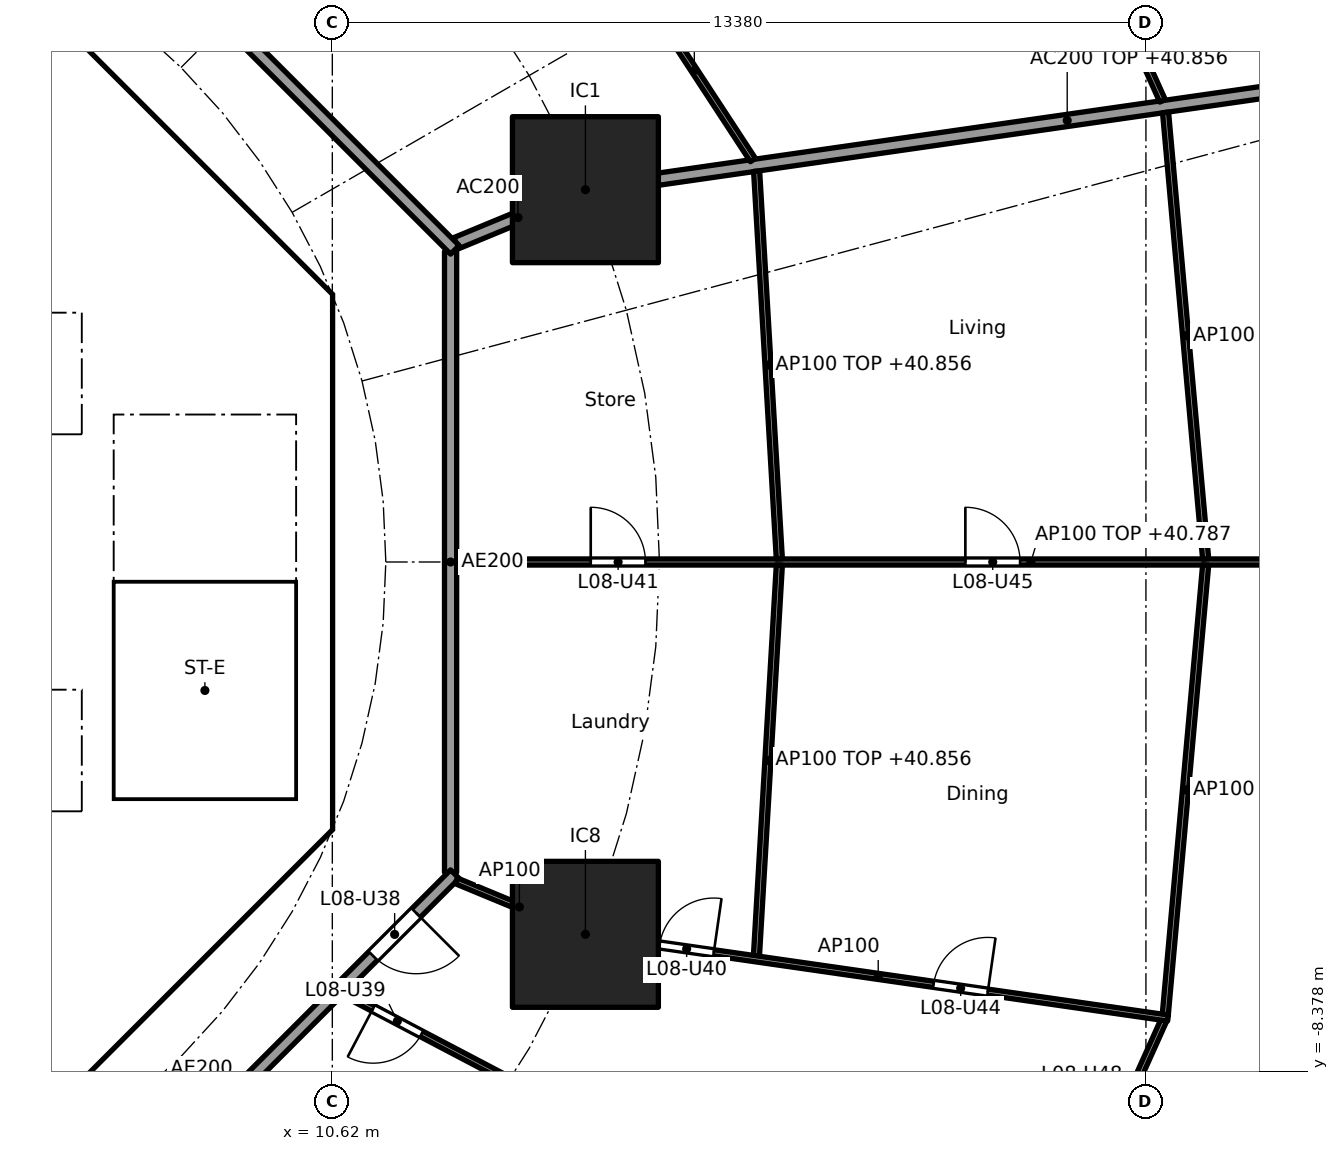
"""IFC4 building model, lengths in metres.
Left out: names, types, materials, properties, quantities, classifications, styles, units other than length and angle.
Written with IfcOpenShell. Run it as: python <this file> out.ifc"""

import sys

from ifc_helpers import new_model, si_unit, direction, frame, frame_2d, origin, origin_2d, place, context, subcontext, project, spatial, polyline, rectangle, outline, extrude, element, fill, save


model = new_model("IFC4")
c1 = context("Model", 3, precision=1e-05, world=origin(), true_north=direction((0.0, 1.0)))
c2 = subcontext(c1, "Body", "Model", "MODEL_VIEW")
j1 = project(units=[si_unit("LENGTHUNIT", "METRE"), si_unit("PLANEANGLEUNIT", "RADIAN")], contexts=[c1])
p1 = place(None, origin())
s1 = spatial("IfcSite", under=j1, at=p1, CompositionType="ELEMENT")
p2 = place(p1, origin())
s2 = spatial("IfcBuilding", under=s1, at=p2, CompositionType="ELEMENT")
p3 = place(p2, frame((0.0, 0.0, 38.1)))
s3 = spatial("IfcBuildingStorey", under=s2, at=p3, CompositionType="ELEMENT", Elevation=38.1)
for number, where, z_axis, x_axis in (
    (1, (14.782, 6.123, 0.0), (0.0, 0.0, 1.0), (1.0, 0.0, 0.0)),
    (2, (14.782, -6.123, 0.0), (0.0, 0.0, 1.0), (1.0, 0.0, 0.0)),
):
    element("IfcColumn", number, at=place(p3, frame(where, z_axis=z_axis, x_axis=x_axis)), inside=s3, PredefinedType="COLUMN", context=c2, shape_type="SweptSolid", body=[
        extrude(rectangle(XDim=2.4, YDim=2.4, at=origin_2d()), origin(), (0.0, 0.0, 1.0), 3.7),
    ])
p4 = place(p3, frame((9.988, 4.613, 0.0), z_axis=(0.0, 0.0, 1.0), x_axis=(-0.707106781187, 0.707106781187, 0.0)))
e3 = element("IfcWall", 3, at=p4, inside=s3, PredefinedType="SHEAR", context=c2, shape_type="SweptSolid", body=[
    extrude(rectangle(XDim=7.602, YDim=0.6, at=frame_2d((3.801, 0.0))), origin(), (0.0, 0.0, 1.0), 3.44),
])
p5 = place(p4, frame((3.201, 0.0, 0.0)))
e4 = element("IfcOpeningElement", 4, at=p5, cuts=e3, PredefinedType="OPENING", context=c2, shape_type="SweptSolid", body=[
    extrude(rectangle(XDim=1.2, YDim=2.1, at=frame_2d((0.6, 1.05))), frame((0.0, 0.31, 0.0), z_axis=(0.0, -1.0, 0.0), x_axis=(1.0, 0.0, 0.0)), (0.0, 0.0, 1.0), 0.62),
])
p6 = place(p3, frame((4.613, -9.988, 0.0), z_axis=(0.0, 0.0, 1.0), x_axis=(0.707106781187, 0.707106781187, 0.0)))
e5 = element("IfcWall", 5, at=p6, inside=s3, PredefinedType="SHEAR", context=c2, shape_type="SweptSolid", body=[
    extrude(rectangle(XDim=7.602, YDim=0.6, at=frame_2d((3.801, 0.0))), origin(), (0.0, 0.0, 1.0), 3.44),
])
p7 = place(p6, frame((3.201, 0.0, 0.0)))
e6 = element("IfcOpeningElement", 6, at=p7, cuts=e5, PredefinedType="OPENING", context=c2, shape_type="SweptSolid", body=[
    extrude(rectangle(XDim=1.2, YDim=2.1, at=frame_2d((0.6, 1.05))), frame((0.0, 0.31, 0.0), z_axis=(0.0, -1.0, 0.0), x_axis=(1.0, 0.0, 0.0)), (0.0, 0.0, 1.0), 0.62),
])
p8 = place(p3, frame((-6.7, 2.0, 0.0), z_axis=(0.0, 0.0, 1.0), x_axis=(1.0, 0.0, 0.0)))
e7 = element("IfcWall", 7, at=p8, inside=s3, PredefinedType="SOLIDWALL", context=c2, shape_type="SweptSolid", body=[
    extrude(rectangle(XDim=13.4, YDim=0.2, at=frame_2d((6.7, 0.0))), origin(), (0.0, 0.0, 1.0), 3.44),
])
p9 = place(p8, frame((0.65, 0.0, 0.0)))
e8 = element("IfcOpeningElement", 8, at=p9, cuts=e7, PredefinedType="OPENING", context=c2, shape_type="SweptSolid", body=[
    extrude(rectangle(XDim=1.1, YDim=2.1, at=frame_2d((0.55, 1.05))), frame((0.0, 0.11, 0.0), z_axis=(0.0, -1.0, 0.0), x_axis=(1.0, 0.0, 0.0)), (0.0, 0.0, 1.0), 0.22),
])
p10 = place(p8, frame((2.85, 0.0, 0.0)))
e9 = element("IfcOpeningElement", 9, at=p10, cuts=e7, PredefinedType="OPENING", context=c2, shape_type="SweptSolid", body=[
    extrude(rectangle(XDim=1.1, YDim=2.1, at=frame_2d((0.55, 1.05))), frame((0.0, 0.11, 0.0), z_axis=(0.0, -1.0, 0.0), x_axis=(1.0, 0.0, 0.0)), (0.0, 0.0, 1.0), 0.22),
])
p11 = place(p8, frame((5.05, 0.0, 0.0)))
e10 = element("IfcOpeningElement", 10, at=p11, cuts=e7, PredefinedType="OPENING", context=c2, shape_type="SweptSolid", body=[
    extrude(rectangle(XDim=1.1, YDim=2.1, at=frame_2d((0.55, 1.05))), frame((0.0, 0.11, 0.0), z_axis=(0.0, -1.0, 0.0), x_axis=(1.0, 0.0, 0.0)), (0.0, 0.0, 1.0), 0.22),
])
p12 = place(p3, frame((6.7, 4.0, 0.0), z_axis=(0.0, 0.0, 1.0), x_axis=(1.0, 0.0, 0.0)))
e11 = element("IfcWall", 11, at=p12, inside=s3, PredefinedType="SOLIDWALL", context=c2, shape_type="SweptSolid", body=[
    extrude(rectangle(XDim=3.325, YDim=0.2, at=frame_2d((1.662, 0.0))), origin(), (0.0, 0.0, 1.0), 3.44),
])
p13 = place(p12, frame((1.25, 0.0, 0.0)))
e12 = element("IfcOpeningElement", 12, at=p13, cuts=e11, PredefinedType="OPENING", context=c2, shape_type="SweptSolid", body=[
    extrude(rectangle(XDim=1.1, YDim=2.1, at=frame_2d((0.55, 1.05))), frame((0.0, 0.11, 0.0), z_axis=(0.0, -1.0, 0.0), x_axis=(1.0, 0.0, 0.0)), (0.0, 0.0, 1.0), 0.22),
])
p14 = place(p3, frame((-6.7, -2.0, 0.0), z_axis=(0.0, 0.0, 1.0), x_axis=(1.0, 0.0, 0.0)))
e13 = element("IfcWall", 13, at=p14, inside=s3, PredefinedType="SOLIDWALL", context=c2, shape_type="SweptSolid", body=[
    extrude(rectangle(XDim=13.4, YDim=0.2, at=frame_2d((6.7, 0.0))), origin(), (0.0, 0.0, 1.0), 3.44),
])
p15 = place(p14, frame((0.65, 0.0, 0.0)))
e14 = element("IfcOpeningElement", 14, at=p15, cuts=e13, PredefinedType="OPENING", context=c2, shape_type="SweptSolid", body=[
    extrude(rectangle(XDim=1.1, YDim=2.1, at=frame_2d((0.55, 1.05))), frame((0.0, 0.11, 0.0), z_axis=(0.0, -1.0, 0.0), x_axis=(1.0, 0.0, 0.0)), (0.0, 0.0, 1.0), 0.22),
])
p16 = place(p14, frame((2.85, 0.0, 0.0)))
e15 = element("IfcOpeningElement", 15, at=p16, cuts=e13, PredefinedType="OPENING", context=c2, shape_type="SweptSolid", body=[
    extrude(rectangle(XDim=1.1, YDim=2.1, at=frame_2d((0.55, 1.05))), frame((0.0, 0.11, 0.0), z_axis=(0.0, -1.0, 0.0), x_axis=(1.0, 0.0, 0.0)), (0.0, 0.0, 1.0), 0.22),
])
p17 = place(p3, origin())
e16 = element("IfcWall", 16, at=p17, inside=s3, PredefinedType="SHEAR", context=c2, shape_type="SweptSolid", body=[
    extrude(outline(polyline([(9.776, -4.401), (10.025, -4.152), (10.025, -3.801), (10.025, 4.152), (9.776, 4.401), (10.2, 4.825), (10.625, 4.401), (10.625, -4.401), (10.2, -4.825), (9.776, -4.401)])), origin(), (0.0, 0.0, 1.0), 3.44),
])
p18 = place(p3, origin())
e17 = element("IfcWall", 17, at=p18, inside=s3, PredefinedType="SOLIDWALL", context=c2, shape_type="SweptSolid", body=[
    extrude(outline(polyline([(-6.7, -2.1), (-6.5, -2.1), (-6.5, -4.1), (-4.5, -4.1), (-4.5, -2.1), (-4.3, -2.1), (-4.3, -4.1), (-2.3, -4.1), (-2.3, -2.1), (-2.1, -2.1), (-2.1, -4.1), (-0.1, -4.1), (-0.1, -2.1), (0.1, -2.1), (0.1, -4.1), (2.1, -4.1), (2.1, -2.1), (2.3, -2.1), (2.3, -4.1), (4.3, -4.1), (4.3, -2.1), (4.5, -2.1), (4.5, -4.1), (6.5, -4.1), (6.5, -2.1), (6.7, -2.1), (6.7, -4.3), (-6.7, -4.3), (-6.7, -2.1)])), origin(), (0.0, 0.0, 1.0), 3.44),
])
p19 = place(p3, origin())
e18 = element("IfcWall", 18, at=p19, inside=s3, PredefinedType="SOLIDWALL", context=c2, shape_type="SweptSolid", body=[
    extrude(outline(polyline([(-6.5, 2.1), (-6.7, 2.1), (-6.7, 4.3), (6.7, 4.3), (6.7, 2.1), (6.5, 2.1), (6.5, 4.1), (4.5, 4.1), (4.5, 2.1), (4.3, 2.1), (4.3, 4.1), (2.3, 4.1), (2.3, 2.1), (2.1, 2.1), (2.1, 4.1), (0.1, 4.1), (0.1, 2.1), (-0.1, 2.1), (-0.1, 4.1), (-2.1, 4.1), (-2.1, 2.1), (-2.3, 2.1), (-2.3, 4.1), (-4.3, 4.1), (-4.3, 2.1), (-4.5, 2.1), (-4.5, 4.1), (-6.5, 4.1), (-6.5, 2.1)])), origin(), (0.0, 0.0, 1.0), 3.44),
])
p20 = place(p3, origin())
e19 = element("IfcWall", 19, at=p20, inside=s3, PredefinedType="SOLIDWALL", context=c2, shape_type="SweptSolid", body=[
    extrude(outline(polyline([(7.025, -3.9), (6.7, -3.9), (6.7, 3.9), (7.025, 3.9), (7.025, -3.9)])), origin(), (0.0, 0.0, 1.0), 3.44),
])
p21 = place(p3, origin())
e20 = element("IfcWall", 20, at=p21, inside=s3, PredefinedType="SOLIDWALL", context=c2, shape_type="SweptSolid", body=[
    extrude(outline(polyline([(10.025, -4.1), (6.7, -4.1), (6.7, -3.9), (10.025, -3.9), (10.025, -4.1)])), origin(), (0.0, 0.0, 1.0), 3.44),
])
p22 = place(p3, frame((12.657, 5.243, 0.0), z_axis=(0.0, 0.0, 1.0), x_axis=(0.923853160736, 0.382747093259, 0.0)))
e21 = element("IfcWall", 21, at=p22, inside=s3, PredefinedType="PARTITIONING", context=c2, shape_type="SweptSolid", body=[
    extrude(rectangle(XDim=2.2, YDim=0.2, at=frame_2d((1.1, 0.0))), origin(), (0.0, 0.0, 1.0), 3.44),
])
p23 = place(p3, frame((14.832, 6.13, 0.0), z_axis=(0.0, 0.0, 1.0), x_axis=(0.989836541293, 0.142209779978, 0.0)))
e22 = element("IfcWall", 22, at=p23, inside=s3, PredefinedType="PARTITIONING", context=c2, shape_type="SweptSolid", body=[
    extrude(rectangle(XDim=15.909, YDim=0.2, at=frame_2d((7.955, 0.0))), origin(), (0.0, 0.0, 1.0), 2.756),
])
p24 = place(p3, frame((12.565, -5.104, 0.0), z_axis=(0.0, 0.0, 1.0), x_axis=(0.0, 1.0, 0.0)))
e23 = element("IfcWall", 23, at=p24, inside=s3, PredefinedType="PARTITIONING", context=c2, shape_type="SweptSolid", body=[
    extrude(rectangle(XDim=10.209, YDim=0.2, at=frame_2d((5.104, 0.0))), origin(), (0.0, 0.0, 1.0), 3.44),
])
p25 = place(p3, frame((12.635, 5.134, 0.0), z_axis=(0.0, 0.0, 1.0), x_axis=(-0.707106781187, 0.707106781187, 0.0)))
e24 = element("IfcWall", 24, at=p25, inside=s3, PredefinedType="PARTITIONING", context=c2, shape_type="SweptSolid", body=[
    extrude(rectangle(XDim=10.609, YDim=0.2, at=frame_2d((5.305, 0.0))), origin(), (0.0, 0.0, 1.0), 3.44),
])
p26 = place(p3, frame((5.275, -12.494, 0.0), z_axis=(0.0, 0.0, 1.0), x_axis=(0.707106781187, 0.707106781187, 0.0)))
e25 = element("IfcWall", 25, at=p26, inside=s3, PredefinedType="PARTITIONING", context=c2, shape_type="SweptSolid", body=[
    extrude(rectangle(XDim=10.409, YDim=0.2, at=frame_2d((5.205, 0.0))), origin(), (0.0, 0.0, 1.0), 3.44),
])
p27 = place(p26, frame((8.508, 0.0, 0.0)))
e26 = element("IfcOpeningElement", 26, at=p27, cuts=e25, PredefinedType="OPENING", context=c2, shape_type="SweptSolid", body=[
    extrude(rectangle(XDim=1.0, YDim=2.1, at=frame_2d((0.5, 1.05))), frame((0.0, 0.11, 0.0), z_axis=(0.0, -1.0, 0.0), x_axis=(1.0, 0.0, 0.0)), (0.0, 0.0, 1.0), 0.22),
])
p28 = place(p3, frame((12.665, 0.0, 0.0), z_axis=(0.0, 0.0, 1.0), x_axis=(1.0, 0.0, 0.0)))
e27 = element("IfcWall", 27, at=p28, inside=s3, PredefinedType="PARTITIONING", context=c2, shape_type="SweptSolid", body=[
    extrude(rectangle(XDim=18.885, YDim=0.1, at=frame_2d((9.443, 0.0))), origin(), (0.0, 0.0, 1.0), 2.687),
])
p29 = place(p28, frame((2.205, 0.0, 0.0)))
e28 = element("IfcOpeningElement", 28, at=p29, cuts=e27, PredefinedType="OPENING", context=c2, shape_type="SweptSolid", body=[
    extrude(rectangle(XDim=0.9, YDim=2.1, at=frame_2d((0.45, 1.05))), frame((0.0, 0.06, 0.0), z_axis=(0.0, -1.0, 0.0), x_axis=(1.0, 0.0, 0.0)), (0.0, 0.0, 1.0), 0.12),
])
p30 = place(p28, frame((8.366, 0.0, 0.0)))
e29 = element("IfcOpeningElement", 29, at=p30, cuts=e27, PredefinedType="OPENING", context=c2, shape_type="SweptSolid", body=[
    extrude(rectangle(XDim=0.9, YDim=2.1, at=frame_2d((0.45, 1.05))), frame((0.0, 0.06, 0.0), z_axis=(0.0, -1.0, 0.0), x_axis=(1.0, 0.0, 0.0)), (0.0, 0.0, 1.0), 0.12),
])
p31 = place(p28, frame((15.154, 0.0, 0.0)))
e30 = element("IfcOpeningElement", 30, at=p31, cuts=e27, PredefinedType="OPENING", context=c2, shape_type="SweptSolid", body=[
    extrude(rectangle(XDim=0.9, YDim=2.1, at=frame_2d((0.45, 1.05))), frame((0.0, 0.06, 0.0), z_axis=(0.0, -1.0, 0.0), x_axis=(1.0, 0.0, 0.0)), (0.0, 0.0, 1.0), 0.12),
])
p32 = place(p3, frame((17.971, 0.05, 0.0), z_axis=(0.0, 0.0, 1.0), x_axis=(-0.058513659907, 0.998286607946, 0.0)))
e31 = element("IfcWall", 31, at=p32, inside=s3, PredefinedType="PARTITIONING", context=c2, shape_type="SweptSolid", body=[
    extrude(rectangle(XDim=6.388, YDim=0.1, at=frame_2d((3.194, 0.0))), origin(), (0.0, 0.0, 1.0), 2.756),
])
p33 = place(p3, frame((17.971, -0.05, 0.0), z_axis=(0.0, 0.0, 1.0), x_axis=(-0.058475267553, -0.998288857538, 0.0)))
e32 = element("IfcWall", 32, at=p33, inside=s3, PredefinedType="PARTITIONING", context=c2, shape_type="SweptSolid", body=[
    extrude(rectangle(XDim=6.438, YDim=0.1, at=frame_2d((3.219, 0.0))), origin(), (0.0, 0.0, 1.0), 2.756),
])
p34 = place(p3, frame((24.982, 0.05, 0.0), z_axis=(0.0, 0.0, 1.0), x_axis=(-0.08944290521, 0.995991951126, 0.0)))
e33 = element("IfcWall", 33, at=p34, inside=s3, PredefinedType="PARTITIONING", context=c2, shape_type="SweptSolid", body=[
    extrude(rectangle(XDim=7.373, YDim=0.1, at=frame_2d((3.686, 0.0))), origin(), (0.0, 0.0, 1.0), 2.756),
])
p35 = place(p3, frame((24.982, -0.05, 0.0), z_axis=(0.0, 0.0, 1.0), x_axis=(-0.089432471274, -0.995992888068, 0.0)))
e34 = element("IfcWall", 34, at=p35, inside=s3, PredefinedType="PARTITIONING", context=c2, shape_type="SweptSolid", body=[
    extrude(rectangle(XDim=7.423, YDim=0.1, at=frame_2d((3.711, 0.0))), origin(), (0.0, 0.0, 1.0), 2.756),
])
p36 = place(p3, frame((17.537, 6.61, 0.0), z_axis=(0.0, 0.0, 1.0), x_axis=(-0.547637987196, 0.836715384692, 0.0)))
e35 = element("IfcWall", 35, at=p36, inside=s3, PredefinedType="PARTITIONING", context=c2, shape_type="SweptSolid", body=[
    extrude(rectangle(XDim=3.52, YDim=0.1, at=frame_2d((1.76, 0.0))), origin(), (0.0, 0.0, 1.0), 2.756),
])
p37 = place(p3, frame((24.273, 7.584, 0.0), z_axis=(0.0, 0.0, 1.0), x_axis=(-0.410201529109, 0.911994904326, 0.0)))
e36 = element("IfcWall", 36, at=p37, inside=s3, PredefinedType="PARTITIONING", context=c2, shape_type="SweptSolid", body=[
    extrude(rectangle(XDim=5.787, YDim=0.1, at=frame_2d((2.894, 0.0))), origin(), (0.0, 0.0, 1.0), 2.756),
])
p38 = place(p37, frame((2.444, 0.0, 0.0)))
e37 = element("IfcOpeningElement", 37, at=p38, cuts=e36, PredefinedType="OPENING", context=c2, shape_type="SweptSolid", body=[
    extrude(rectangle(XDim=0.9, YDim=2.1, at=frame_2d((0.45, 1.05))), frame((0.0, 0.06, 0.0), z_axis=(0.0, -1.0, 0.0), x_axis=(1.0, 0.0, 0.0)), (0.0, 0.0, 1.0), 0.12),
])
p39 = place(p3, frame((10.813, -7.091, 0.0), z_axis=(0.0, 0.0, 1.0), x_axis=(0.885182649479, -0.465243674928, 0.0)))
e38 = element("IfcWall", 38, at=p39, inside=s3, PredefinedType="PARTITIONING", context=c2, shape_type="SweptSolid", body=[
    extrude(rectangle(XDim=12.551, YDim=0.1, at=frame_2d((6.275, 0.0))), origin(), (0.0, 0.0, 1.0), 2.687),
])
p40 = place(p39, frame((0.539, 0.0, 0.0)))
e39 = element("IfcOpeningElement", 39, at=p40, cuts=e38, PredefinedType="OPENING", context=c2, shape_type="SweptSolid", body=[
    extrude(rectangle(XDim=0.9, YDim=2.1, at=frame_2d((0.45, 1.05))), frame((0.0, 0.06, 0.0), z_axis=(0.0, -1.0, 0.0), x_axis=(1.0, 0.0, 0.0)), (0.0, 0.0, 1.0), 0.12),
])
p41 = place(p39, frame((8.494, 0.0, 0.0)))
e40 = element("IfcOpeningElement", 40, at=p41, cuts=e38, PredefinedType="OPENING", context=c2, shape_type="SweptSolid", body=[
    extrude(rectangle(XDim=0.9, YDim=2.1, at=frame_2d((0.45, 1.05))), frame((0.0, 0.06, 0.0), z_axis=(0.0, -1.0, 0.0), x_axis=(1.0, 0.0, 0.0)), (0.0, 0.0, 1.0), 0.12),
])
p42 = place(p3, frame((21.899, -12.861, 0.0), z_axis=(0.0, 0.0, 1.0), x_axis=(0.410197710154, 0.911996622025, 0.0)))
e41 = element("IfcWall", 41, at=p42, inside=s3, PredefinedType="PARTITIONING", context=c2, shape_type="SweptSolid", body=[
    extrude(rectangle(XDim=5.837, YDim=0.1, at=frame_2d((2.918, 0.0))), origin(), (0.0, 0.0, 1.0), 2.756),
])
p43 = place(p42, frame((3.928, 0.0, 0.0)))
e42 = element("IfcOpeningElement", 42, at=p43, cuts=e41, PredefinedType="OPENING", context=c2, shape_type="SweptSolid", body=[
    extrude(rectangle(XDim=0.9, YDim=2.1, at=frame_2d((0.45, 1.05))), frame((0.0, 0.06, 0.0), z_axis=(0.0, -1.0, 0.0), x_axis=(1.0, 0.0, 0.0)), (0.0, 0.0, 1.0), 0.12),
])
p44 = place(p3, frame((12.657, -5.243, 0.0), z_axis=(0.0, 0.0, 1.0), x_axis=(0.923864733477, -0.382719158442, 0.0)))
e43 = element("IfcWall", 43, at=p44, inside=s3, PredefinedType="PARTITIONING", context=c2, shape_type="SweptSolid", body=[
    extrude(rectangle(XDim=2.25, YDim=0.1, at=frame_2d((1.125, 0.0))), origin(), (0.0, 0.0, 1.0), 3.44),
])
p45 = place(p3, frame((14.832, -6.13, 0.0), z_axis=(0.0, 0.0, 1.0), x_axis=(0.989837122016, -0.142205737856, 0.0)))
e44 = element("IfcWall", 44, at=p45, inside=s3, PredefinedType="PARTITIONING", context=c2, shape_type="SweptSolid", body=[
    extrude(rectangle(XDim=9.63, YDim=0.1, at=frame_2d((4.815, 0.0))), origin(), (0.0, 0.0, 1.0), 3.44),
])
p46 = place(p45, frame((1.182, 0.0, 0.0)))
e45 = element("IfcOpeningElement", 45, at=p46, cuts=e44, PredefinedType="OPENING", context=c2, shape_type="SweptSolid", body=[
    extrude(rectangle(XDim=0.9, YDim=2.1, at=frame_2d((0.45, 1.05))), frame((0.0, 0.06, 0.0), z_axis=(0.0, -1.0, 0.0), x_axis=(1.0, 0.0, 0.0)), (0.0, 0.0, 1.0), 0.12),
])
p47 = place(p45, frame((5.734, 0.0, 0.0)))
e46 = element("IfcOpeningElement", 46, at=p47, cuts=e44, PredefinedType="OPENING", context=c2, shape_type="SweptSolid", body=[
    extrude(rectangle(XDim=0.9, YDim=2.1, at=frame_2d((0.45, 1.05))), frame((0.0, 0.06, 0.0), z_axis=(0.0, -1.0, 0.0), x_axis=(1.0, 0.0, 0.0)), (0.0, 0.0, 1.0), 0.12),
])
p48 = place(p13, frame((1.1, 0.0, 0.0), x_axis=(-1.0, 0.0, 0.0)))
e47 = element("IfcDoor", 47, at=p48, inside=s3, OperationType="SINGLE_SWING_LEFT", PredefinedType="DOOR", context=c2, shape_type="SweptSolid", body=[
    extrude(rectangle(XDim=1.1, YDim=2.1, at=frame_2d((0.55, 1.05))), frame((0.0, 0.025, 0.0), z_axis=(0.0, -1.0, 0.0), x_axis=(1.0, 0.0, 0.0)), (0.0, 0.0, 1.0), 0.05),
])
fill(e12, e47)
p49 = place(p5, origin())
e48 = element("IfcDoor", 48, at=p49, inside=s3, OperationType="SINGLE_SWING_RIGHT", PredefinedType="DOOR", context=c2, shape_type="SweptSolid", body=[
    extrude(rectangle(XDim=1.2, YDim=2.1, at=frame_2d((0.6, 1.05))), frame((0.0, 0.025, 0.0), z_axis=(0.0, -1.0, 0.0), x_axis=(1.0, 0.0, 0.0)), (0.0, 0.0, 1.0), 0.05),
])
fill(e4, e48)
p50 = place(p7, origin())
e49 = element("IfcDoor", 49, at=p50, inside=s3, OperationType="SINGLE_SWING_RIGHT", PredefinedType="DOOR", context=c2, shape_type="SweptSolid", body=[
    extrude(rectangle(XDim=1.2, YDim=2.1, at=frame_2d((0.6, 1.05))), frame((0.0, 0.025, 0.0), z_axis=(0.0, -1.0, 0.0), x_axis=(1.0, 0.0, 0.0)), (0.0, 0.0, 1.0), 0.05),
])
fill(e6, e49)
p51 = place(p27, frame((1.0, 0.0, 0.0), x_axis=(-1.0, 0.0, 0.0)))
e50 = element("IfcDoor", 50, at=p51, inside=s3, OperationType="SINGLE_SWING_LEFT", PredefinedType="DOOR", context=c2, shape_type="SweptSolid", body=[
    extrude(rectangle(XDim=1.0, YDim=2.1, at=frame_2d((0.5, 1.05))), frame((0.0, 0.025, 0.0), z_axis=(0.0, -1.0, 0.0), x_axis=(1.0, 0.0, 0.0)), (0.0, 0.0, 1.0), 0.05),
])
fill(e26, e50)
p52 = place(p40, frame((0.9, 0.0, 0.0), x_axis=(-1.0, 0.0, 0.0)))
e51 = element("IfcDoor", 51, at=p52, inside=s3, OperationType="SINGLE_SWING_RIGHT", PredefinedType="DOOR", context=c2, shape_type="SweptSolid", body=[
    extrude(rectangle(XDim=0.9, YDim=2.1, at=frame_2d((0.45, 1.05))), frame((0.0, 0.025, 0.0), z_axis=(0.0, -1.0, 0.0), x_axis=(1.0, 0.0, 0.0)), (0.0, 0.0, 1.0), 0.05),
])
fill(e39, e51)
p53 = place(p46, origin())
e52 = element("IfcDoor", 52, at=p53, inside=s3, OperationType="SINGLE_SWING_RIGHT", PredefinedType="DOOR", context=c2, shape_type="SweptSolid", body=[
    extrude(rectangle(XDim=0.9, YDim=2.1, at=frame_2d((0.45, 1.05))), frame((0.0, 0.025, 0.0), z_axis=(0.0, -1.0, 0.0), x_axis=(1.0, 0.0, 0.0)), (0.0, 0.0, 1.0), 0.05),
])
fill(e45, e52)
p54 = place(p29, origin())
e53 = element("IfcDoor", 53, at=p54, inside=s3, OperationType="SINGLE_SWING_LEFT", PredefinedType="DOOR", context=c2, shape_type="SweptSolid", body=[
    extrude(rectangle(XDim=0.9, YDim=2.1, at=frame_2d((0.45, 1.05))), frame((0.0, 0.025, 0.0), z_axis=(0.0, -1.0, 0.0), x_axis=(1.0, 0.0, 0.0)), (0.0, 0.0, 1.0), 0.05),
])
fill(e28, e53)
p55 = place(p47, origin())
e54 = element("IfcDoor", 54, at=p55, inside=s3, OperationType="SINGLE_SWING_RIGHT", PredefinedType="DOOR", context=c2, shape_type="SweptSolid", body=[
    extrude(rectangle(XDim=0.9, YDim=2.1, at=frame_2d((0.45, 1.05))), frame((0.0, 0.025, 0.0), z_axis=(0.0, -1.0, 0.0), x_axis=(1.0, 0.0, 0.0)), (0.0, 0.0, 1.0), 0.05),
])
fill(e46, e54)
p56 = place(p30, origin())
e55 = element("IfcDoor", 55, at=p56, inside=s3, OperationType="SINGLE_SWING_LEFT", PredefinedType="DOOR", context=c2, shape_type="SweptSolid", body=[
    extrude(rectangle(XDim=0.9, YDim=2.1, at=frame_2d((0.45, 1.05))), frame((0.0, 0.025, 0.0), z_axis=(0.0, -1.0, 0.0), x_axis=(1.0, 0.0, 0.0)), (0.0, 0.0, 1.0), 0.05),
])
fill(e29, e55)
save(model, sys.argv[1])
